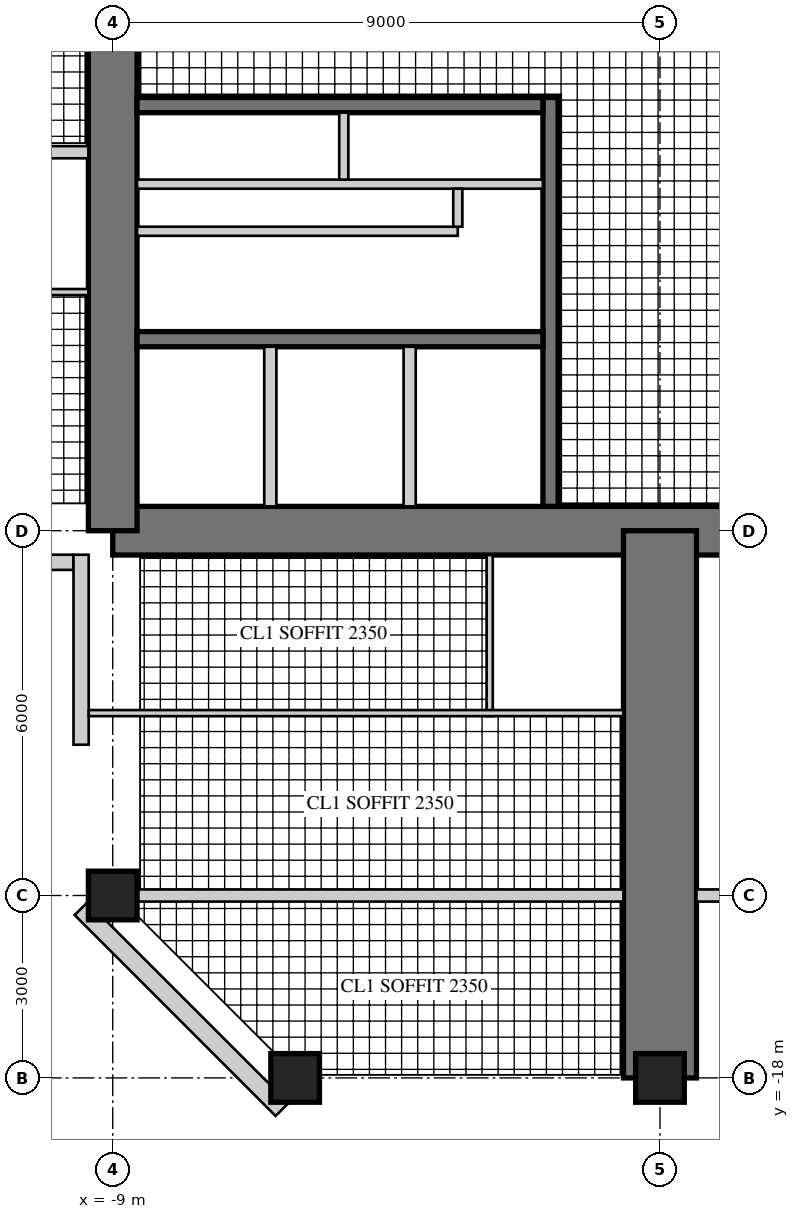
"""IFC4 building model, lengths in metres.
Left out: names, types, materials, properties, quantities, classifications, styles, units other than length and angle.
Written with IfcOpenShell. Run it as: python <this file> out.ifc"""

import sys

from ifc_helpers import new_model, si_unit, direction, frame, frame_2d, origin, origin_2d, place, context, subcontext, project, spatial, rectangle, hollow_rectangle, extrude, element, fill, save


model = new_model("IFC4")
c1 = context("Model", 3, precision=1e-05, world=origin(), true_north=direction((0.0, 1.0)))
c2 = subcontext(c1, "Body", "Model", "MODEL_VIEW")
j1 = project(units=[si_unit("LENGTHUNIT", "METRE"), si_unit("PLANEANGLEUNIT", "RADIAN")], contexts=[c1])
p1 = place(None, origin())
s1 = spatial("IfcSite", under=j1, at=p1, CompositionType="ELEMENT")
p2 = place(p1, origin())
s2 = spatial("IfcBuilding", under=s1, at=p2, CompositionType="ELEMENT")
p3 = place(p2, frame((0.0, 0.0, 235.7)))
s3 = spatial("IfcBuildingStorey", under=s2, at=p3, CompositionType="ELEMENT", Elevation=235.7)
p4 = place(p3, frame((-9.0, -9.0, 0.0), z_axis=(0.0, 0.0, 1.0), x_axis=(1.0, 0.0, 0.0)))
e1 = element("IfcWall", 1, at=p4, inside=s3, PredefinedType="SHEAR", context=c2, shape_type="SweptSolid", body=[
    extrude(rectangle(XDim=18.0, YDim=0.8, at=frame_2d((9.0, 0.0))), origin(), (0.0, 0.0, 1.0), 3.4),
])
p5 = place(p4, frame((9.8, 0.0, 0.0)))
e2 = element("IfcOpeningElement", 2, at=p5, cuts=e1, PredefinedType="OPENING", context=c2, shape_type="SweptSolid", body=[
    extrude(rectangle(XDim=1.0, YDim=2.4, at=frame_2d((0.5, 1.2))), frame((0.0, 0.41, 0.0), z_axis=(0.0, -1.0, 0.0), x_axis=(1.0, 0.0, 0.0)), (0.0, 0.0, 1.0), 0.82),
])
p6 = place(p3, frame((-9.0, 9.0, 0.0), z_axis=(0.0, 0.0, 1.0), x_axis=(0.0, -1.0, 0.0)))
e3 = element("IfcWall", 3, at=p6, inside=s3, PredefinedType="SHEAR", context=c2, shape_type="SweptSolid", body=[
    extrude(rectangle(XDim=18.0, YDim=0.8, at=frame_2d((9.0, 0.0))), origin(), (0.0, 0.0, 1.0), 3.4),
])
p7 = place(p6, frame((9.8, 0.0, 0.0)))
e4 = element("IfcOpeningElement", 4, at=p7, cuts=e3, PredefinedType="OPENING", context=c2, shape_type="SweptSolid", body=[
    extrude(rectangle(XDim=1.0, YDim=2.4, at=frame_2d((0.5, 1.2))), frame((0.0, 0.41, 0.0), z_axis=(0.0, -1.0, 0.0), x_axis=(1.0, 0.0, 0.0)), (0.0, 0.0, 1.0), 0.82),
])
p8 = place(p3, frame((-1.8, -1.875, 0.0), z_axis=(0.0, 0.0, 1.0), x_axis=(0.0, -1.0, 0.0)))
e5 = element("IfcWall", 5, at=p8, inside=s3, PredefinedType="SHEAR", context=c2, shape_type="SweptSolid", body=[
    extrude(rectangle(XDim=6.725, YDim=0.25, at=frame_2d((3.363, 0.0))), origin(), (0.0, 0.0, 1.0), 3.4),
])
p9 = place(p8, frame((1.875, 0.0, 0.0)))
e6 = element("IfcOpeningElement", 6, at=p9, cuts=e5, PredefinedType="OPENING", context=c2, shape_type="SweptSolid", body=[
    extrude(rectangle(XDim=1.6, YDim=2.4, at=frame_2d((0.8, 1.2))), frame((0.0, 0.135, 0.0), z_axis=(0.0, -1.0, 0.0), x_axis=(1.0, 0.0, 0.0)), (0.0, 0.0, 1.0), 0.27),
])
p10 = place(p3, frame((-1.925, -2.0, 0.0), z_axis=(0.0, 0.0, 1.0), x_axis=(-1.0, 0.0, 0.0)))
e7 = element("IfcWall", 7, at=p10, inside=s3, PredefinedType="SHEAR", context=c2, shape_type="SweptSolid", body=[
    extrude(rectangle(XDim=6.675, YDim=0.25, at=frame_2d((3.337, 0.0))), origin(), (0.0, 0.0, 1.0), 3.4),
])
p11 = place(p3, frame((-1.925, -5.85, 0.0), z_axis=(0.0, 0.0, 1.0), x_axis=(-1.0, 0.0, 0.0)))
e8 = element("IfcWall", 8, at=p11, inside=s3, PredefinedType="SHEAR", context=c2, shape_type="SweptSolid", body=[
    extrude(rectangle(XDim=6.675, YDim=0.25, at=frame_2d((3.337, 0.0))), origin(), (0.0, 0.0, 1.0), 3.4),
])
p12 = place(p11, frame((0.496, 0.0, 0.0)))
e9 = element("IfcOpeningElement", 9, at=p12, cuts=e8, PredefinedType="OPENING", context=c2, shape_type="SweptSolid", body=[
    extrude(rectangle(XDim=1.1, YDim=2.2, at=frame_2d((0.55, 1.1))), frame((0.0, 0.135, 0.0), z_axis=(0.0, -1.0, 0.0), x_axis=(1.0, 0.0, 0.0)), (0.0, 0.0, 1.0), 0.27),
])
p13 = place(p11, frame((2.788, 0.0, 0.0)))
e10 = element("IfcOpeningElement", 10, at=p13, cuts=e8, PredefinedType="OPENING", context=c2, shape_type="SweptSolid", body=[
    extrude(rectangle(XDim=1.1, YDim=2.2, at=frame_2d((0.55, 1.1))), frame((0.0, 0.135, 0.0), z_axis=(0.0, -1.0, 0.0), x_axis=(1.0, 0.0, 0.0)), (0.0, 0.0, 1.0), 0.27),
])
p14 = place(p11, frame((5.079, 0.0, 0.0)))
e11 = element("IfcOpeningElement", 11, at=p14, cuts=e8, PredefinedType="OPENING", context=c2, shape_type="SweptSolid", body=[
    extrude(rectangle(XDim=1.1, YDim=2.2, at=frame_2d((0.55, 1.1))), frame((0.0, 0.135, 0.0), z_axis=(0.0, -1.0, 0.0), x_axis=(1.0, 0.0, 0.0)), (0.0, 0.0, 1.0), 0.27),
])
p15 = place(p3, frame((-1.925, -3.3, 0.0), z_axis=(0.0, 0.0, 1.0), x_axis=(-1.0, 0.0, 0.0)))
e12 = element("IfcWall", 12, at=p15, inside=s3, PredefinedType="PARTITIONING", context=c2, shape_type="SweptSolid", body=[
    extrude(rectangle(XDim=6.675, YDim=0.15, at=frame_2d((3.337, 0.0))), origin(), (0.0, 0.0, 1.0), 3.4),
])
p16 = place(p15, frame((0.075, 0.0, 0.0)))
e13 = element("IfcOpeningElement", 13, at=p16, cuts=e12, PredefinedType="OPENING", context=c2, shape_type="SweptSolid", body=[
    extrude(rectangle(XDim=0.8, YDim=2.1, at=frame_2d((0.4, 1.05))), frame((0.0, 0.085, 0.0), z_axis=(0.0, -1.0, 0.0), x_axis=(1.0, 0.0, 0.0)), (0.0, 0.0, 1.0), 0.17),
])
p17 = place(p15, frame((3.675, 0.0, 0.0)))
e14 = element("IfcOpeningElement", 14, at=p17, cuts=e12, PredefinedType="OPENING", context=c2, shape_type="SweptSolid", body=[
    extrude(rectangle(XDim=0.8, YDim=2.1, at=frame_2d((0.4, 1.05))), frame((0.0, 0.085, 0.0), z_axis=(0.0, -1.0, 0.0), x_axis=(1.0, 0.0, 0.0)), (0.0, 0.0, 1.0), 0.17),
])
p18 = place(p3, frame((-5.2, -2.125, 0.0), z_axis=(0.0, 0.0, 1.0), x_axis=(0.0, -1.0, 0.0)))
e15 = element("IfcWall", 15, at=p18, inside=s3, PredefinedType="PARTITIONING", context=c2, shape_type="SweptSolid", body=[
    extrude(rectangle(XDim=1.1, YDim=0.15, at=frame_2d((0.55, 0.0))), origin(), (0.0, 0.0, 1.0), 3.4),
])
for number, where, z_axis, x_axis in (
    (16, (-4.117, -5.975, 0.0), (0.0, 0.0, 1.0), (0.0, -1.0, 0.0)),
    (17, (-6.408, -5.975, 0.0), (0.0, 0.0, 1.0), (0.0, -1.0, 0.0)),
):
    element("IfcWall", number, at=place(p3, frame(where, z_axis=z_axis, x_axis=x_axis)), inside=s3, PredefinedType="PARTITIONING", context=c2, shape_type="SweptSolid", body=[
        extrude(rectangle(XDim=2.625, YDim=0.2, at=frame_2d((1.312, 0.0))), origin(), (0.0, 0.0, 1.0), 3.4),
    ])
p19 = place(p3, frame((0.0, -9.0, 0.0), z_axis=(0.0, 0.0, 1.0), x_axis=(0.0, -1.0, 0.0)))
e18 = element("IfcWall", 18, at=p19, inside=s3, PredefinedType="SHEAR", context=c2, shape_type="SweptSolid", body=[
    extrude(rectangle(XDim=9.0, YDim=1.2, at=frame_2d((4.5, 0.0))), origin(), (0.0, 0.0, 1.0), 3.4),
])
p20 = place(p19, frame((3.8, 0.0, 0.0)))
e19 = element("IfcOpeningElement", 19, at=p20, cuts=e18, PredefinedType="OPENING", context=c2, shape_type="SweptSolid", body=[
    extrude(rectangle(XDim=1.0, YDim=2.15, at=frame_2d((0.5, 1.075))), frame((0.0, 0.61, 0.0), z_axis=(0.0, -1.0, 0.0), x_axis=(1.0, 0.0, 0.0)), (0.0, 0.0, 1.0), 1.22),
])
p21 = place(p19, frame((7.0, 0.0, 0.0)))
e20 = element("IfcOpeningElement", 20, at=p21, cuts=e18, PredefinedType="OPENING", context=c2, shape_type="SweptSolid", body=[
    extrude(rectangle(XDim=1.0, YDim=2.2, at=frame_2d((0.5, 1.1))), frame((0.0, 0.61, 0.0), z_axis=(0.0, -1.0, 0.0), x_axis=(1.0, 0.0, 0.0)), (0.0, 0.0, 1.0), 1.22),
])
for number, where, z_axis, x_axis in (
    (21, (-9.0, -15.0, 0.0), (0.0, 0.0, 1.0), (1.0, 0.0, 0.0)),
    (22, (-6.0, -18.0, 0.0), (0.0, 0.0, 1.0), (1.0, 0.0, 0.0)),
    (23, (0.0, -18.0, 0.0), (0.0, 0.0, 1.0), (1.0, 0.0, 0.0)),
):
    element("IfcColumn", number, at=place(p3, frame(where, z_axis=z_axis, x_axis=x_axis)), inside=s3, PredefinedType="COLUMN", context=c2, shape_type="SweptSolid", body=[
        extrude(rectangle(XDim=0.8, YDim=0.8, at=origin_2d()), origin(), (0.0, 0.0, 1.0), 3.4),
    ])
p22 = place(p3, frame((-12.52, -9.52, 0.0), z_axis=(0.0, 0.0, 1.0), x_axis=(1.0, 0.0, 0.0)))
e24 = element("IfcWall", 24, at=p22, inside=s3, PredefinedType="SOLIDWALL", context=c2, shape_type="SweptSolid", body=[
    extrude(rectangle(XDim=2.875, YDim=0.25, at=frame_2d((1.438, 0.0))), origin(), (0.0, 0.0, 1.0), 3.22),
])
p23 = place(p22, frame((0.6, 0.0, 0.0)))
e25 = element("IfcOpeningElement", 25, at=p23, cuts=e24, PredefinedType="OPENING", context=c2, shape_type="SweptSolid", body=[
    extrude(rectangle(XDim=1.0, YDim=2.2, at=frame_2d((0.5, 1.1))), frame((0.0, 0.135, 0.0), z_axis=(0.0, -1.0, 0.0), x_axis=(1.0, 0.0, 0.0)), (0.0, 0.0, 1.0), 0.27),
])
p24 = place(p3, frame((-9.52, -9.395, 0.0), z_axis=(0.0, 0.0, 1.0), x_axis=(0.0, -1.0, 0.0)))
e26 = element("IfcWall", 26, at=p24, inside=s3, PredefinedType="SOLIDWALL", context=c2, shape_type="SweptSolid", body=[
    extrude(rectangle(XDim=3.125, YDim=0.25, at=frame_2d((1.562, 0.0))), origin(), (0.0, 0.0, 1.0), 3.22),
])
p25 = place(p24, frame((0.6, 0.0, 0.0)))
e27 = element("IfcOpeningElement", 27, at=p25, cuts=e26, PredefinedType="OPENING", context=c2, shape_type="SweptSolid", body=[
    extrude(rectangle(XDim=1.0, YDim=2.2, at=frame_2d((0.5, 1.1))), frame((0.0, 0.135, 0.0), z_axis=(0.0, -1.0, 0.0), x_axis=(1.0, 0.0, 0.0)), (0.0, 0.0, 1.0), 0.27),
])
p26 = place(p3, frame((-9.52, -15.215, 0.0), z_axis=(0.0, 0.0, 1.0), x_axis=(0.707106781187, -0.707106781187, 0.0)))
e28 = element("IfcWall", 28, at=p26, inside=s3, PredefinedType="SOLIDWALL", context=c2, shape_type="SweptSolid", body=[
    extrude(rectangle(XDim=4.674, YDim=0.3, at=frame_2d((2.337, 0.0))), origin(), (0.0, 0.0, 1.0), 3.22),
])
p27 = place(p26, frame((1.887, 0.0, 0.3)))
e29 = element("IfcOpeningElement", 29, at=p27, cuts=e28, PredefinedType="OPENING", context=c2, shape_type="SweptSolid", body=[
    extrude(rectangle(XDim=0.9, YDim=2.4, at=frame_2d((0.45, 1.2))), frame((0.0, 0.16, 0.0), z_axis=(0.0, -1.0, 0.0), x_axis=(1.0, 0.0, 0.0)), (0.0, 0.0, 1.0), 0.32),
])
p28 = place(p3, frame((-3.325, -4.075, 0.0), z_axis=(0.0, 0.0, 1.0), x_axis=(-1.0, 0.0, 0.0)))
e30 = element("IfcWall", 30, at=p28, inside=s3, PredefinedType="PARTITIONING", context=c2, shape_type="SweptSolid", body=[
    extrude(rectangle(XDim=5.275, YDim=0.15, at=frame_2d((2.638, 0.0))), origin(), (0.0, 0.0, 1.0), 3.22),
])
p29 = place(p28, frame((2.137, 0.0, 0.0)))
e31 = element("IfcOpeningElement", 31, at=p29, cuts=e30, PredefinedType="OPENING", context=c2, shape_type="SweptSolid", body=[
    extrude(rectangle(XDim=1.0, YDim=2.1, at=frame_2d((0.5, 1.05))), frame((0.0, 0.085, 0.0), z_axis=(0.0, -1.0, 0.0), x_axis=(1.0, 0.0, 0.0)), (0.0, 0.0, 1.0), 0.17),
])
p30 = place(p3, frame((-3.325, -3.375, 0.0), z_axis=(0.0, 0.0, 1.0), x_axis=(0.0, -1.0, 0.0)))
e32 = element("IfcWall", 32, at=p30, inside=s3, PredefinedType="PARTITIONING", context=c2, shape_type="SweptSolid", body=[
    extrude(rectangle(XDim=0.625, YDim=0.15, at=frame_2d((0.312, 0.0))), origin(), (0.0, 0.0, 1.0), 3.22),
])
p31 = place(p3, frame((-2.8, -9.4, 0.0), z_axis=(0.0, 0.0, 1.0), x_axis=(0.0, -1.0, 0.0)))
e33 = element("IfcWall", 33, at=p31, inside=s3, PredefinedType="PARTITIONING", context=c2, shape_type="SweptSolid", body=[
    extrude(rectangle(XDim=2.65, YDim=0.1, at=frame_2d((1.325, 0.0))), origin(), (0.0, 0.0, 1.0), 3.22),
])
p32 = place(p3, frame((-9.395, -12.0, 0.0), z_axis=(0.0, 0.0, 1.0), x_axis=(1.0, 0.0, 0.0)))
e34 = element("IfcWall", 34, at=p32, inside=s3, PredefinedType="PARTITIONING", context=c2, shape_type="SweptSolid", body=[
    extrude(rectangle(XDim=8.795, YDim=0.1, at=frame_2d((4.397, 0.0))), origin(), (0.0, 0.0, 1.0), 3.22),
])
p33 = place(p32, frame((5.245, 0.0, 0.0)))
e35 = element("IfcOpeningElement", 35, at=p33, cuts=e34, PredefinedType="OPENING", context=c2, shape_type="SweptSolid", body=[
    extrude(rectangle(XDim=0.9, YDim=2.1, at=frame_2d((0.45, 1.05))), frame((0.0, 0.06, 0.0), z_axis=(0.0, -1.0, 0.0), x_axis=(1.0, 0.0, 0.0)), (0.0, 0.0, 1.0), 0.12),
])
p34 = place(p32, frame((7.345, 0.0, 0.0)))
e36 = element("IfcOpeningElement", 36, at=p34, cuts=e34, PredefinedType="OPENING", context=c2, shape_type="SweptSolid", body=[
    extrude(rectangle(XDim=0.9, YDim=2.1, at=frame_2d((0.45, 1.05))), frame((0.0, 0.06, 0.0), z_axis=(0.0, -1.0, 0.0), x_axis=(1.0, 0.0, 0.0)), (0.0, 0.0, 1.0), 0.12),
])
p35 = place(p3, frame((-8.6, -15.0, 0.0), z_axis=(0.0, 0.0, 1.0), x_axis=(1.0, 0.0, 0.0)))
e37 = element("IfcWall", 37, at=p35, inside=s3, PredefinedType="SOLIDWALL", context=c2, shape_type="SweptSolid", body=[
    extrude(rectangle(XDim=8.0, YDim=0.2, at=frame_2d((4.0, 0.0))), origin(), (0.0, 0.0, 1.0), 2.52),
])
p36 = place(p3, frame((0.6, -15.0, 0.0), z_axis=(0.0, 0.0, 1.0), x_axis=(1.0, 0.0, 0.0)))
e38 = element("IfcWall", 38, at=p36, inside=s3, PredefinedType="SOLIDWALL", context=c2, shape_type="SweptSolid", body=[
    extrude(rectangle(XDim=8.0, YDim=0.2, at=frame_2d((4.0, 0.0))), origin(), (0.0, 0.0, 1.0), 2.52),
])
p37 = place(p36, frame((0.35, 0.0, 0.0)))
e39 = element("IfcOpeningElement", 39, at=p37, cuts=e38, PredefinedType="OPENING", context=c2, shape_type="SweptSolid", body=[
    extrude(rectangle(XDim=1.0, YDim=2.2, at=frame_2d((0.5, 1.1))), frame((0.0, 0.11, 0.0), z_axis=(0.0, -1.0, 0.0), x_axis=(1.0, 0.0, 0.0)), (0.0, 0.0, 1.0), 0.22),
])
p38 = place(p3, frame((-9.4, -5.075, 0.0), z_axis=(0.0, 0.0, 1.0), x_axis=(-1.0, 0.0, 0.0)))
e40 = element("IfcWall", 40, at=p38, inside=s3, PredefinedType="PARTITIONING", context=c2, shape_type="SweptSolid", body=[
    extrude(rectangle(XDim=2.65, YDim=0.1, at=frame_2d((1.325, 0.0))), origin(), (0.0, 0.0, 1.0), 3.22),
])
p39 = place(p3, frame((-9.4, -2.775, 0.0), z_axis=(0.0, 0.0, 1.0), x_axis=(-1.0, 0.0, 0.0)))
e41 = element("IfcWall", 41, at=p39, inside=s3, PredefinedType="SOLIDWALL", context=c2, shape_type="SweptSolid", body=[
    extrude(rectangle(XDim=11.6, YDim=0.2, at=frame_2d((5.8, 0.0))), origin(), (0.0, 0.0, 1.0), 3.22),
])
p40 = place(p39, frame((3.4, 0.0, 0.0)))
e42 = element("IfcOpeningElement", 42, at=p40, cuts=e41, PredefinedType="OPENING", context=c2, shape_type="SweptSolid", body=[
    extrude(rectangle(XDim=1.0, YDim=2.15, at=frame_2d((0.5, 1.075))), frame((0.0, 0.11, 0.0), z_axis=(0.0, -1.0, 0.0), x_axis=(1.0, 0.0, 0.0)), (0.0, 0.0, 1.0), 0.22),
])
p41 = place(p25, origin())
e43 = element("IfcDoor", 43, at=p41, inside=s3, OperationType="SINGLE_SWING_RIGHT", PredefinedType="DOOR", context=c2, shape_type="SweptSolid", body=[
    extrude(hollow_rectangle(XDim=1.0, YDim=2.2, WallThickness=0.06, at=frame_2d((0.5, 1.1))), frame((0.0, 0.025, 0.0), z_axis=(0.0, -1.0, 0.0), x_axis=(1.0, 0.0, 0.0)), (0.0, 0.0, 1.0), 0.05),
    extrude(rectangle(XDim=0.879, YDim=2.079, at=frame_2d((0.5, 1.1))), frame((0.0, 0.025, 0.0), z_axis=(0.0, -1.0, 0.0), x_axis=(1.0, 0.0, 0.0)), (0.0, 0.0, 1.0), 0.05),
])
fill(e27, e43)
p42 = place(p27, origin())
e44 = element("IfcWindow", 44, at=p42, inside=s3, PartitioningType="SINGLE_PANEL", PredefinedType="WINDOW", context=c2, shape_type="SweptSolid", body=[
    extrude(hollow_rectangle(XDim=0.9, YDim=2.4, WallThickness=0.06, at=frame_2d((0.45, 1.2))), frame((0.0, 0.03, 0.0), z_axis=(0.0, -1.0, 0.0), x_axis=(1.0, 0.0, 0.0)), (0.0, 0.0, 1.0), 0.06),
    extrude(rectangle(XDim=0.779, YDim=2.279, at=frame_2d((0.45, 1.2))), frame((0.0, 0.03, 0.0), z_axis=(0.0, -1.0, 0.0), x_axis=(1.0, 0.0, 0.0)), (0.0, 0.0, 1.0), 0.06),
])
fill(e29, e44)
p43 = place(p29, frame((1.0, 0.0, 0.0), z_axis=(0.0, 0.0, 1.0), x_axis=(-1.0, 0.0, 0.0)))
e45 = element("IfcDoor", 45, at=p43, inside=s3, OperationType="DOUBLE_DOOR_SINGLE_SWING", PredefinedType="DOOR", context=c2, shape_type="SweptSolid", body=[
    extrude(rectangle(XDim=1.0, YDim=2.1, at=frame_2d((0.5, 1.05))), frame((0.0, 0.025, 0.0), z_axis=(0.0, -1.0, 0.0), x_axis=(1.0, 0.0, 0.0)), (0.0, 0.0, 1.0), 0.05),
])
fill(e31, e45)
p44 = place(p33, origin())
e46 = element("IfcDoor", 46, at=p44, inside=s3, OperationType="SINGLE_SWING_RIGHT", PredefinedType="DOOR", context=c2, shape_type="SweptSolid", body=[
    extrude(rectangle(XDim=0.9, YDim=2.1, at=frame_2d((0.45, 1.05))), frame((0.0, 0.025, 0.0), z_axis=(0.0, -1.0, 0.0), x_axis=(1.0, 0.0, 0.0)), (0.0, 0.0, 1.0), 0.05),
])
fill(e35, e46)
p45 = place(p34, origin())
e47 = element("IfcDoor", 47, at=p45, inside=s3, OperationType="SINGLE_SWING_RIGHT", PredefinedType="DOOR", context=c2, shape_type="SweptSolid", body=[
    extrude(rectangle(XDim=0.9, YDim=2.1, at=frame_2d((0.45, 1.05))), frame((0.0, 0.025, 0.0), z_axis=(0.0, -1.0, 0.0), x_axis=(1.0, 0.0, 0.0)), (0.0, 0.0, 1.0), 0.05),
])
fill(e36, e47)
p46 = place(p37, frame((1.0, 0.0, 0.0), z_axis=(0.0, 0.0, 1.0), x_axis=(-1.0, 0.0, 0.0)))
e48 = element("IfcDoor", 48, at=p46, inside=s3, OperationType="SINGLE_SWING_LEFT", PredefinedType="DOOR", context=c2, shape_type="SweptSolid", body=[
    extrude(rectangle(XDim=1.0, YDim=2.2, at=frame_2d((0.5, 1.1))), frame((0.0, 0.025, 0.0), z_axis=(0.0, -1.0, 0.0), x_axis=(1.0, 0.0, 0.0)), (0.0, 0.0, 1.0), 0.05),
])
fill(e39, e48)
p47 = place(p20, frame((1.0, 0.0, 0.0), z_axis=(0.0, 0.0, 1.0), x_axis=(-1.0, 0.0, 0.0)))
e49 = element("IfcDoor", 49, at=p47, inside=s3, OperationType="SINGLE_SWING_RIGHT", PredefinedType="DOOR", context=c2, shape_type="SweptSolid", body=[
    extrude(rectangle(XDim=1.0, YDim=2.15, at=frame_2d((0.5, 1.075))), frame((0.0, 0.025, 0.0), z_axis=(0.0, -1.0, 0.0), x_axis=(1.0, 0.0, 0.0)), (0.0, 0.0, 1.0), 0.05),
])
fill(e19, e49)
p48 = place(p21, origin())
e50 = element("IfcDoor", 50, at=p48, inside=s3, OperationType="SINGLE_SWING_LEFT", PredefinedType="DOOR", context=c2, shape_type="SweptSolid", body=[
    extrude(rectangle(XDim=1.0, YDim=2.2, at=frame_2d((0.5, 1.1))), frame((0.0, 0.025, 0.0), z_axis=(0.0, -1.0, 0.0), x_axis=(1.0, 0.0, 0.0)), (0.0, 0.0, 1.0), 0.05),
])
fill(e20, e50)
p49 = place(p5, origin())
e51 = element("IfcDoor", 51, at=p49, inside=s3, OperationType="SINGLE_SWING_RIGHT", PredefinedType="DOOR", context=c2, shape_type="SweptSolid", body=[
    extrude(rectangle(XDim=1.0, YDim=2.4, at=frame_2d((0.5, 1.2))), frame((0.0, 0.055, 0.0), z_axis=(0.0, -1.0, 0.0), x_axis=(1.0, 0.0, 0.0)), (0.0, 0.0, 1.0), 0.05),
])
fill(e2, e51)
p50 = place(p7, origin())
e52 = element("IfcDoor", 52, at=p50, inside=s3, OperationType="SINGLE_SWING_RIGHT", PredefinedType="DOOR", context=c2, shape_type="SweptSolid", body=[
    extrude(rectangle(XDim=1.0, YDim=2.4, at=frame_2d((0.5, 1.2))), frame((0.0, 0.055, 0.0), z_axis=(0.0, -1.0, 0.0), x_axis=(1.0, 0.0, 0.0)), (0.0, 0.0, 1.0), 0.05),
])
fill(e4, e52)
p51 = place(p12, origin())
e53 = element("IfcDoor", 53, at=p51, inside=s3, OperationType="DOUBLE_DOOR_SLIDING", PredefinedType="DOOR", context=c2, shape_type="SweptSolid", body=[
    extrude(rectangle(XDim=1.1, YDim=2.2, at=frame_2d((0.55, 1.1))), frame((0.0, 0.025, 0.0), z_axis=(0.0, -1.0, 0.0), x_axis=(1.0, 0.0, 0.0)), (0.0, 0.0, 1.0), 0.05),
])
fill(e9, e53)
p52 = place(p13, origin())
e54 = element("IfcDoor", 54, at=p52, inside=s3, OperationType="DOUBLE_DOOR_SLIDING", PredefinedType="DOOR", context=c2, shape_type="SweptSolid", body=[
    extrude(rectangle(XDim=1.1, YDim=2.2, at=frame_2d((0.55, 1.1))), frame((0.0, 0.025, 0.0), z_axis=(0.0, -1.0, 0.0), x_axis=(1.0, 0.0, 0.0)), (0.0, 0.0, 1.0), 0.05),
])
fill(e10, e54)
p53 = place(p14, origin())
e55 = element("IfcDoor", 55, at=p53, inside=s3, OperationType="DOUBLE_DOOR_SLIDING", PredefinedType="DOOR", context=c2, shape_type="SweptSolid", body=[
    extrude(rectangle(XDim=1.1, YDim=2.2, at=frame_2d((0.55, 1.1))), frame((0.0, 0.025, 0.0), z_axis=(0.0, -1.0, 0.0), x_axis=(1.0, 0.0, 0.0)), (0.0, 0.0, 1.0), 0.05),
])
fill(e11, e55)
p54 = place(p9, origin())
e56 = element("IfcDoor", 56, at=p54, inside=s3, OperationType="DOUBLE_DOOR_DOUBLE_SWING", PredefinedType="DOOR", context=c2, shape_type="SweptSolid", body=[
    extrude(rectangle(XDim=1.6, YDim=2.4, at=frame_2d((0.8, 1.2))), frame((0.0, 0.025, 0.0), z_axis=(0.0, -1.0, 0.0), x_axis=(1.0, 0.0, 0.0)), (0.0, 0.0, 1.0), 0.05),
])
fill(e6, e56)
p55 = place(p16, frame((0.8, 0.0, 0.0), z_axis=(0.0, 0.0, 1.0), x_axis=(-1.0, 0.0, 0.0)))
e57 = element("IfcDoor", 57, at=p55, inside=s3, OperationType="SINGLE_SWING_RIGHT", PredefinedType="DOOR", context=c2, shape_type="SweptSolid", body=[
    extrude(rectangle(XDim=0.8, YDim=2.1, at=frame_2d((0.4, 1.05))), frame((0.0, 0.025, 0.0), z_axis=(0.0, -1.0, 0.0), x_axis=(1.0, 0.0, 0.0)), (0.0, 0.0, 1.0), 0.05),
])
fill(e13, e57)
p56 = place(p17, frame((0.8, 0.0, 0.0), z_axis=(0.0, 0.0, 1.0), x_axis=(-1.0, 0.0, 0.0)))
e58 = element("IfcDoor", 58, at=p56, inside=s3, OperationType="SINGLE_SWING_RIGHT", PredefinedType="DOOR", context=c2, shape_type="SweptSolid", body=[
    extrude(rectangle(XDim=0.8, YDim=2.1, at=frame_2d((0.4, 1.05))), frame((0.0, 0.025, 0.0), z_axis=(0.0, -1.0, 0.0), x_axis=(1.0, 0.0, 0.0)), (0.0, 0.0, 1.0), 0.05),
])
fill(e14, e58)
save(model, sys.argv[1])
